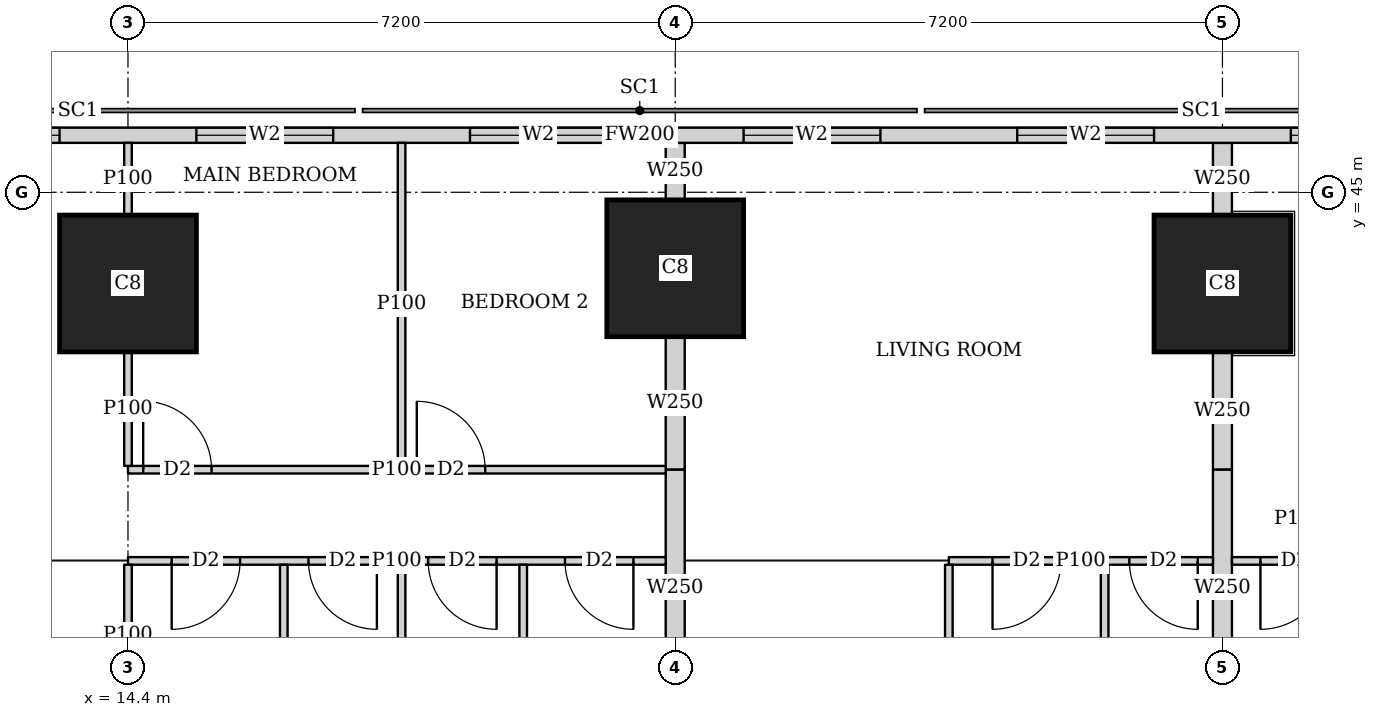
"""IFC4 building model, lengths in metres.
Left out: names, types, materials, properties, quantities, classifications, styles, units other than length and angle.
Written with IfcOpenShell. Run it as: python <this file> out.ifc"""

import sys

from ifc_helpers import new_model, si_unit, direction, frame, frame_2d, origin, origin_2d, place, context, subcontext, project, spatial, rectangle, extrude, element, fill, save


model = new_model("IFC4")
c1 = context("Model", 3, precision=1e-05, world=origin(), true_north=direction((0.0, 1.0)))
c2 = subcontext(c1, "Body", "Model", "MODEL_VIEW")
j1 = project(units=[si_unit("LENGTHUNIT", "METRE"), si_unit("PLANEANGLEUNIT", "RADIAN")], contexts=[c1])
p1 = place(None, origin())
s1 = spatial("IfcSite", under=j1, at=p1, CompositionType="ELEMENT")
p2 = place(p1, origin())
s2 = spatial("IfcBuilding", under=s1, at=p2, CompositionType="ELEMENT")
p3 = place(p2, frame((0.0, 0.0, 180.8)))
s3 = spatial("IfcBuildingStorey", under=s2, at=p3, CompositionType="ELEMENT", Elevation=180.8)
for number, where, z_axis, x_axis in (
    (1, (14.4, 43.8, 0.0), (0.0, 0.0, 1.0), (1.0, 0.0, 0.0)),
    (2, (21.6, 44.0, 0.0), (0.0, 0.0, 1.0), (1.0, 0.0, 0.0)),
    (3, (28.8, 43.8, 0.0), (0.0, 0.0, 1.0), (1.0, 0.0, 0.0)),
):
    element("IfcColumn", number, at=place(p3, frame(where, z_axis=z_axis, x_axis=x_axis)), inside=s3, PredefinedType="COLUMN", context=c2, shape_type="SweptSolid", body=[
        extrude(rectangle(XDim=1.8, YDim=1.8, at=origin_2d()), origin(), (0.0, 0.0, 1.0), 3.75),
    ])
p4 = place(p3, frame((40.106, 45.75, 0.0), z_axis=(0.0, 0.0, 1.0), x_axis=(-1.0, 0.0, 0.0)))
e4 = element("IfcWall", 4, at=p4, inside=s3, PredefinedType="SOLIDWALL", context=c2, shape_type="SweptSolid", body=[
    extrude(rectangle(XDim=37.943, YDim=0.2, at=frame_2d((18.971, 0.0))), origin(), (0.0, 0.0, 1.0), 3.5),
])
p5 = place(p4, frame((8.606, 0.0, 0.9)))
e5 = element("IfcOpeningElement", 5, at=p5, cuts=e4, PredefinedType="OPENING", context=c2, shape_type="SweptSolid", body=[
    extrude(rectangle(XDim=1.8, YDim=1.5, at=frame_2d((0.9, 0.75))), frame((0.0, 0.11, 0.0), z_axis=(0.0, -1.0, 0.0), x_axis=(1.0, 0.0, 0.0)), (0.0, 0.0, 1.0), 0.22),
])
p6 = place(p4, frame((12.206, 0.0, 0.9)))
e6 = element("IfcOpeningElement", 6, at=p6, cuts=e4, PredefinedType="OPENING", context=c2, shape_type="SweptSolid", body=[
    extrude(rectangle(XDim=1.8, YDim=1.5, at=frame_2d((0.9, 0.75))), frame((0.0, 0.11, 0.0), z_axis=(0.0, -1.0, 0.0), x_axis=(1.0, 0.0, 0.0)), (0.0, 0.0, 1.0), 0.22),
])
p7 = place(p4, frame((15.806, 0.0, 0.9)))
e7 = element("IfcOpeningElement", 7, at=p7, cuts=e4, PredefinedType="OPENING", context=c2, shape_type="SweptSolid", body=[
    extrude(rectangle(XDim=1.8, YDim=1.5, at=frame_2d((0.9, 0.75))), frame((0.0, 0.11, 0.0), z_axis=(0.0, -1.0, 0.0), x_axis=(1.0, 0.0, 0.0)), (0.0, 0.0, 1.0), 0.22),
])
p8 = place(p4, frame((19.406, 0.0, 0.9)))
e8 = element("IfcOpeningElement", 8, at=p8, cuts=e4, PredefinedType="OPENING", context=c2, shape_type="SweptSolid", body=[
    extrude(rectangle(XDim=1.8, YDim=1.5, at=frame_2d((0.9, 0.75))), frame((0.0, 0.11, 0.0), z_axis=(0.0, -1.0, 0.0), x_axis=(1.0, 0.0, 0.0)), (0.0, 0.0, 1.0), 0.22),
])
p9 = place(p4, frame((23.006, 0.0, 0.9)))
e9 = element("IfcOpeningElement", 9, at=p9, cuts=e4, PredefinedType="OPENING", context=c2, shape_type="SweptSolid", body=[
    extrude(rectangle(XDim=1.8, YDim=1.5, at=frame_2d((0.9, 0.75))), frame((0.0, 0.11, 0.0), z_axis=(0.0, -1.0, 0.0), x_axis=(1.0, 0.0, 0.0)), (0.0, 0.0, 1.0), 0.22),
])
p10 = place(p4, frame((26.606, 0.0, 0.9)))
e10 = element("IfcOpeningElement", 10, at=p10, cuts=e4, PredefinedType="OPENING", context=c2, shape_type="SweptSolid", body=[
    extrude(rectangle(XDim=1.8, YDim=1.5, at=frame_2d((0.9, 0.75))), frame((0.0, 0.11, 0.0), z_axis=(0.0, -1.0, 0.0), x_axis=(1.0, 0.0, 0.0)), (0.0, 0.0, 1.0), 0.22),
])
p11 = place(p3, frame((14.4, 41.35, 0.0), z_axis=(0.0, 0.0, 1.0), x_axis=(1.0, 0.0, 0.0)))
e11 = element("IfcWall", 11, at=p11, inside=s3, PredefinedType="PARTITIONING", context=c2, shape_type="SweptSolid", body=[
    extrude(rectangle(XDim=7.075, YDim=0.1, at=frame_2d((3.538, 0.0))), origin(), (0.0, 0.0, 1.0), 3.5),
])
p12 = place(p11, frame((0.2, 0.0, 0.0)))
e12 = element("IfcOpeningElement", 12, at=p12, cuts=e11, PredefinedType="OPENING", context=c2, shape_type="SweptSolid", body=[
    extrude(rectangle(XDim=0.9, YDim=2.1, at=frame_2d((0.45, 1.05))), frame((0.0, 0.06, 0.0), z_axis=(0.0, -1.0, 0.0), x_axis=(1.0, 0.0, 0.0)), (0.0, 0.0, 1.0), 0.12),
])
p13 = place(p11, frame((3.8, 0.0, 0.0)))
e13 = element("IfcOpeningElement", 13, at=p13, cuts=e11, PredefinedType="OPENING", context=c2, shape_type="SweptSolid", body=[
    extrude(rectangle(XDim=0.9, YDim=2.1, at=frame_2d((0.45, 1.05))), frame((0.0, 0.06, 0.0), z_axis=(0.0, -1.0, 0.0), x_axis=(1.0, 0.0, 0.0)), (0.0, 0.0, 1.0), 0.12),
])
p14 = place(p3, frame((14.4, 40.15, 0.0), z_axis=(0.0, 0.0, 1.0), x_axis=(1.0, 0.0, 0.0)))
e14 = element("IfcWall", 14, at=p14, inside=s3, PredefinedType="PARTITIONING", context=c2, shape_type="SweptSolid", body=[
    extrude(rectangle(XDim=7.075, YDim=0.1, at=frame_2d((3.538, 0.0))), origin(), (0.0, 0.0, 1.0), 3.5),
])
p15 = place(p14, frame((0.575, 0.0, 0.0)))
e15 = element("IfcOpeningElement", 15, at=p15, cuts=e14, PredefinedType="OPENING", context=c2, shape_type="SweptSolid", body=[
    extrude(rectangle(XDim=0.9, YDim=2.1, at=frame_2d((0.45, 1.05))), frame((0.0, 0.06, 0.0), z_axis=(0.0, -1.0, 0.0), x_axis=(1.0, 0.0, 0.0)), (0.0, 0.0, 1.0), 0.12),
])
p16 = place(p14, frame((3.95, 0.0, 0.0)))
e16 = element("IfcOpeningElement", 16, at=p16, cuts=e14, PredefinedType="OPENING", context=c2, shape_type="SweptSolid", body=[
    extrude(rectangle(XDim=0.9, YDim=2.1, at=frame_2d((0.45, 1.05))), frame((0.0, 0.06, 0.0), z_axis=(0.0, -1.0, 0.0), x_axis=(1.0, 0.0, 0.0)), (0.0, 0.0, 1.0), 0.12),
])
p17 = place(p14, frame((2.375, 0.0, 0.0)))
e17 = element("IfcOpeningElement", 17, at=p17, cuts=e14, PredefinedType="OPENING", context=c2, shape_type="SweptSolid", body=[
    extrude(rectangle(XDim=0.9, YDim=2.1, at=frame_2d((0.45, 1.05))), frame((0.0, 0.06, 0.0), z_axis=(0.0, -1.0, 0.0), x_axis=(1.0, 0.0, 0.0)), (0.0, 0.0, 1.0), 0.12),
])
p18 = place(p14, frame((5.75, 0.0, 0.0)))
e18 = element("IfcOpeningElement", 18, at=p18, cuts=e14, PredefinedType="OPENING", context=c2, shape_type="SweptSolid", body=[
    extrude(rectangle(XDim=0.9, YDim=2.1, at=frame_2d((0.45, 1.05))), frame((0.0, 0.06, 0.0), z_axis=(0.0, -1.0, 0.0), x_axis=(1.0, 0.0, 0.0)), (0.0, 0.0, 1.0), 0.12),
])
p19 = place(p3, frame((14.4, 41.4, 0.0), z_axis=(0.0, 0.0, 1.0), x_axis=(0.0, 1.0, 0.0)))
e19 = element("IfcWall", 19, at=p19, inside=s3, PredefinedType="PARTITIONING", context=c2, shape_type="SweptSolid", body=[
    extrude(rectangle(XDim=1.499, YDim=0.1, at=frame_2d((0.75, 0.0))), origin(), (0.0, 0.0, 1.0), 3.5),
])
p20 = place(p3, frame((14.4, 44.701, 0.0), z_axis=(0.0, 0.0, 1.0), x_axis=(0.0, 1.0, 0.0)))
e20 = element("IfcWall", 20, at=p20, inside=s3, PredefinedType="PARTITIONING", context=c2, shape_type="SweptSolid", body=[
    extrude(rectangle(XDim=0.949, YDim=0.1, at=frame_2d((0.475, 0.0))), origin(), (0.0, 0.0, 1.0), 3.5),
])
p21 = place(p3, frame((18.0, 41.4, 0.0), z_axis=(0.0, 0.0, 1.0), x_axis=(0.0, 1.0, 0.0)))
e21 = element("IfcWall", 21, at=p21, inside=s3, PredefinedType="PARTITIONING", context=c2, shape_type="SweptSolid", body=[
    extrude(rectangle(XDim=4.25, YDim=0.1, at=frame_2d((2.125, 0.0))), origin(), (0.0, 0.0, 1.0), 2.1),
])
p22 = place(p3, frame((14.4, 38.251, 0.0), z_axis=(0.0, 0.0, 1.0), x_axis=(0.0, 1.0, 0.0)))
e22 = element("IfcWall", 22, at=p22, inside=s3, PredefinedType="PARTITIONING", context=c2, shape_type="SweptSolid", body=[
    extrude(rectangle(XDim=1.849, YDim=0.1, at=frame_2d((0.925, 0.0))), origin(), (0.0, 0.0, 1.0), 3.5),
])
for number, where, z_axis, x_axis in (
    (23, (18.0, 36.575, 0.0), (0.0, 0.0, 1.0), (0.0, 1.0, 0.0)),
    (24, (16.45, 36.575, 0.0), (0.0, 0.0, 1.0), (0.0, 1.0, 0.0)),
    (25, (19.6, 36.575, 0.0), (0.0, 0.0, 1.0), (0.0, 1.0, 0.0)),
):
    element("IfcWall", number, at=place(p3, frame(where, z_axis=z_axis, x_axis=x_axis)), inside=s3, PredefinedType="PARTITIONING", context=c2, shape_type="SweptSolid", body=[
        extrude(rectangle(XDim=3.525, YDim=0.1, at=frame_2d((1.763, 0.0))), origin(), (0.0, 0.0, 1.0), 3.5),
    ])
p23 = place(p3, frame((25.2, 40.15, 0.0), z_axis=(0.0, 0.0, 1.0), x_axis=(1.0, 0.0, 0.0)))
e26 = element("IfcWall", 26, at=p23, inside=s3, PredefinedType="PARTITIONING", context=c2, shape_type="SweptSolid", body=[
    extrude(rectangle(XDim=3.475, YDim=0.1, at=frame_2d((1.738, 0.0))), origin(), (0.0, 0.0, 1.0), 3.5),
])
p24 = place(p23, frame((0.575, 0.0, 0.0)))
e27 = element("IfcOpeningElement", 27, at=p24, cuts=e26, PredefinedType="OPENING", context=c2, shape_type="SweptSolid", body=[
    extrude(rectangle(XDim=0.9, YDim=2.1, at=frame_2d((0.45, 1.05))), frame((0.0, 0.06, 0.0), z_axis=(0.0, -1.0, 0.0), x_axis=(1.0, 0.0, 0.0)), (0.0, 0.0, 1.0), 0.12),
])
p25 = place(p23, frame((2.375, 0.0, 0.0)))
e28 = element("IfcOpeningElement", 28, at=p25, cuts=e26, PredefinedType="OPENING", context=c2, shape_type="SweptSolid", body=[
    extrude(rectangle(XDim=0.9, YDim=2.1, at=frame_2d((0.45, 1.05))), frame((0.0, 0.06, 0.0), z_axis=(0.0, -1.0, 0.0), x_axis=(1.0, 0.0, 0.0)), (0.0, 0.0, 1.0), 0.12),
])
for number, where, z_axis, x_axis in (
    (29, (25.2, 36.575, 0.0), (0.0, 0.0, 1.0), (0.0, 1.0, 0.0)),
    (30, (27.25, 36.575, 0.0), (0.0, 0.0, 1.0), (0.0, 1.0, 0.0)),
):
    element("IfcWall", number, at=place(p3, frame(where, z_axis=z_axis, x_axis=x_axis)), inside=s3, PredefinedType="PARTITIONING", context=c2, shape_type="SweptSolid", body=[
        extrude(rectangle(XDim=3.525, YDim=0.1, at=frame_2d((1.763, 0.0))), origin(), (0.0, 0.0, 1.0), 3.5),
    ])
p26 = place(p3, frame((21.6, 41.35, 0.0), z_axis=(0.0, 0.0, 1.0), x_axis=(0.0, 1.0, 0.0)))
e31 = element("IfcWall", 31, at=p26, inside=s3, PredefinedType="SOLIDWALL", context=c2, shape_type="SweptSolid", body=[
    extrude(rectangle(XDim=1.749, YDim=0.25, at=frame_2d((0.875, 0.0))), origin(), (0.0, 0.0, 1.0), 2.1),
])
p27 = place(p3, frame((21.6, 44.901, 0.0), z_axis=(0.0, 0.0, 1.0), x_axis=(0.0, 1.0, 0.0)))
e32 = element("IfcWall", 32, at=p27, inside=s3, PredefinedType="SOLIDWALL", context=c2, shape_type="SweptSolid", body=[
    extrude(rectangle(XDim=0.749, YDim=0.25, at=frame_2d((0.375, 0.0))), origin(), (0.0, 0.0, 1.0), 2.1),
])
p28 = place(p3, frame((21.6, 38.251, 0.0), z_axis=(0.0, 0.0, 1.0), x_axis=(0.0, 1.0, 0.0)))
e33 = element("IfcWall", 33, at=p28, inside=s3, PredefinedType="SOLIDWALL", context=c2, shape_type="SweptSolid", body=[
    extrude(rectangle(XDim=3.099, YDim=0.25, at=frame_2d((1.55, 0.0))), origin(), (0.0, 0.0, 1.0), 3.5),
])
p29 = place(p3, frame((28.925, 40.15, 0.0), z_axis=(0.0, 0.0, 1.0), x_axis=(1.0, 0.0, 0.0)))
e34 = element("IfcWall", 34, at=p29, inside=s3, PredefinedType="PARTITIONING", context=c2, shape_type="SweptSolid", body=[
    extrude(rectangle(XDim=1.765, YDim=0.1, at=frame_2d((0.882, 0.0))), origin(), (0.0, 0.0, 1.0), 3.5),
])
p30 = place(p29, frame((0.375, 0.0, 0.0)))
e35 = element("IfcOpeningElement", 35, at=p30, cuts=e34, PredefinedType="OPENING", context=c2, shape_type="SweptSolid", body=[
    extrude(rectangle(XDim=0.9, YDim=2.1, at=frame_2d((0.45, 1.05))), frame((0.0, 0.06, 0.0), z_axis=(0.0, -1.0, 0.0), x_axis=(1.0, 0.0, 0.0)), (0.0, 0.0, 1.0), 0.12),
])
p31 = place(p3, frame((28.8, 41.35, 0.0), z_axis=(0.0, 0.0, 1.0), x_axis=(0.0, 1.0, 0.0)))
e36 = element("IfcWall", 36, at=p31, inside=s3, PredefinedType="SOLIDWALL", context=c2, shape_type="SweptSolid", body=[
    extrude(rectangle(XDim=1.549, YDim=0.25, at=frame_2d((0.774, 0.0))), origin(), (0.0, 0.0, 1.0), 2.1),
])
p32 = place(p3, frame((28.8, 44.701, 0.0), z_axis=(0.0, 0.0, 1.0), x_axis=(0.0, 1.0, 0.0)))
e37 = element("IfcWall", 37, at=p32, inside=s3, PredefinedType="SOLIDWALL", context=c2, shape_type="SweptSolid", body=[
    extrude(rectangle(XDim=0.949, YDim=0.25, at=frame_2d((0.475, 0.0))), origin(), (0.0, 0.0, 1.0), 2.1),
])
p33 = place(p3, frame((28.8, 38.251, 0.0), z_axis=(0.0, 0.0, 1.0), x_axis=(0.0, 1.0, 0.0)))
e38 = element("IfcWall", 38, at=p33, inside=s3, PredefinedType="SOLIDWALL", context=c2, shape_type="SweptSolid", body=[
    extrude(rectangle(XDim=3.099, YDim=0.25, at=frame_2d((1.55, 0.0))), origin(), (0.0, 0.0, 1.0), 3.5),
])
p34 = place(p5, origin())
e39 = element("IfcWindow", 39, at=p34, inside=s3, PartitioningType="SINGLE_PANEL", PredefinedType="WINDOW", context=c2, shape_type="SweptSolid", body=[
    extrude(rectangle(XDim=1.8, YDim=1.5, at=frame_2d((0.9, 0.75))), frame((0.0, 0.03, 0.0), z_axis=(0.0, -1.0, 0.0), x_axis=(1.0, 0.0, 0.0)), (0.0, 0.0, 1.0), 0.06),
])
fill(e5, e39)
p35 = place(p6, origin())
e40 = element("IfcWindow", 40, at=p35, inside=s3, PartitioningType="SINGLE_PANEL", PredefinedType="WINDOW", context=c2, shape_type="SweptSolid", body=[
    extrude(rectangle(XDim=1.8, YDim=1.5, at=frame_2d((0.9, 0.75))), frame((0.0, 0.03, 0.0), z_axis=(0.0, -1.0, 0.0), x_axis=(1.0, 0.0, 0.0)), (0.0, 0.0, 1.0), 0.06),
])
fill(e6, e40)
p36 = place(p7, origin())
e41 = element("IfcWindow", 41, at=p36, inside=s3, PartitioningType="SINGLE_PANEL", PredefinedType="WINDOW", context=c2, shape_type="SweptSolid", body=[
    extrude(rectangle(XDim=1.8, YDim=1.5, at=frame_2d((0.9, 0.75))), frame((0.0, 0.03, 0.0), z_axis=(0.0, -1.0, 0.0), x_axis=(1.0, 0.0, 0.0)), (0.0, 0.0, 1.0), 0.06),
])
fill(e7, e41)
p37 = place(p8, origin())
e42 = element("IfcWindow", 42, at=p37, inside=s3, PartitioningType="SINGLE_PANEL", PredefinedType="WINDOW", context=c2, shape_type="SweptSolid", body=[
    extrude(rectangle(XDim=1.8, YDim=1.5, at=frame_2d((0.9, 0.75))), frame((0.0, 0.03, 0.0), z_axis=(0.0, -1.0, 0.0), x_axis=(1.0, 0.0, 0.0)), (0.0, 0.0, 1.0), 0.06),
])
fill(e8, e42)
p38 = place(p9, origin())
e43 = element("IfcWindow", 43, at=p38, inside=s3, PartitioningType="SINGLE_PANEL", PredefinedType="WINDOW", context=c2, shape_type="SweptSolid", body=[
    extrude(rectangle(XDim=1.8, YDim=1.5, at=frame_2d((0.9, 0.75))), frame((0.0, 0.03, 0.0), z_axis=(0.0, -1.0, 0.0), x_axis=(1.0, 0.0, 0.0)), (0.0, 0.0, 1.0), 0.06),
])
fill(e9, e43)
p39 = place(p10, origin())
e44 = element("IfcWindow", 44, at=p39, inside=s3, PartitioningType="SINGLE_PANEL", PredefinedType="WINDOW", context=c2, shape_type="SweptSolid", body=[
    extrude(rectangle(XDim=1.8, YDim=1.5, at=frame_2d((0.9, 0.75))), frame((0.0, 0.03, 0.0), z_axis=(0.0, -1.0, 0.0), x_axis=(1.0, 0.0, 0.0)), (0.0, 0.0, 1.0), 0.06),
])
fill(e10, e44)
p40 = place(p12, origin())
e45 = element("IfcDoor", 45, at=p40, inside=s3, OperationType="SINGLE_SWING_LEFT", PredefinedType="DOOR", context=c2, shape_type="SweptSolid", body=[
    extrude(rectangle(XDim=0.9, YDim=2.1, at=frame_2d((0.45, 1.05))), frame((0.0, 0.025, 0.0), z_axis=(0.0, -1.0, 0.0), x_axis=(1.0, 0.0, 0.0)), (0.0, 0.0, 1.0), 0.05),
])
fill(e12, e45)
p41 = place(p13, origin())
e46 = element("IfcDoor", 46, at=p41, inside=s3, OperationType="SINGLE_SWING_LEFT", PredefinedType="DOOR", context=c2, shape_type="SweptSolid", body=[
    extrude(rectangle(XDim=0.9, YDim=2.1, at=frame_2d((0.45, 1.05))), frame((0.0, 0.025, 0.0), z_axis=(0.0, -1.0, 0.0), x_axis=(1.0, 0.0, 0.0)), (0.0, 0.0, 1.0), 0.05),
])
fill(e13, e46)
p42 = place(p15, origin())
e47 = element("IfcDoor", 47, at=p42, inside=s3, OperationType="SINGLE_SWING_RIGHT", PredefinedType="DOOR", context=c2, shape_type="SweptSolid", body=[
    extrude(rectangle(XDim=0.9, YDim=2.1, at=frame_2d((0.45, 1.05))), frame((0.0, 0.025, 0.0), z_axis=(0.0, -1.0, 0.0), x_axis=(1.0, 0.0, 0.0)), (0.0, 0.0, 1.0), 0.05),
])
fill(e15, e47)
p43 = place(p16, origin())
e48 = element("IfcDoor", 48, at=p43, inside=s3, OperationType="SINGLE_SWING_LEFT", PredefinedType="DOOR", context=c2, shape_type="SweptSolid", body=[
    extrude(rectangle(XDim=0.9, YDim=2.1, at=frame_2d((0.45, 1.05))), frame((0.0, 0.025, 0.0), z_axis=(0.0, -1.0, 0.0), x_axis=(1.0, 0.0, 0.0)), (0.0, 0.0, 1.0), 0.05),
])
fill(e16, e48)
p44 = place(p17, origin())
e49 = element("IfcDoor", 49, at=p44, inside=s3, OperationType="SINGLE_SWING_LEFT", PredefinedType="DOOR", context=c2, shape_type="SweptSolid", body=[
    extrude(rectangle(XDim=0.9, YDim=2.1, at=frame_2d((0.45, 1.05))), frame((0.0, 0.025, 0.0), z_axis=(0.0, -1.0, 0.0), x_axis=(1.0, 0.0, 0.0)), (0.0, 0.0, 1.0), 0.05),
])
fill(e17, e49)
p45 = place(p18, origin())
e50 = element("IfcDoor", 50, at=p45, inside=s3, OperationType="SINGLE_SWING_LEFT", PredefinedType="DOOR", context=c2, shape_type="SweptSolid", body=[
    extrude(rectangle(XDim=0.9, YDim=2.1, at=frame_2d((0.45, 1.05))), frame((0.0, 0.025, 0.0), z_axis=(0.0, -1.0, 0.0), x_axis=(1.0, 0.0, 0.0)), (0.0, 0.0, 1.0), 0.05),
])
fill(e18, e50)
p46 = place(p24, origin())
e51 = element("IfcDoor", 51, at=p46, inside=s3, OperationType="SINGLE_SWING_RIGHT", PredefinedType="DOOR", context=c2, shape_type="SweptSolid", body=[
    extrude(rectangle(XDim=0.9, YDim=2.1, at=frame_2d((0.45, 1.05))), frame((0.0, 0.025, 0.0), z_axis=(0.0, -1.0, 0.0), x_axis=(1.0, 0.0, 0.0)), (0.0, 0.0, 1.0), 0.05),
])
fill(e27, e51)
p47 = place(p25, origin())
e52 = element("IfcDoor", 52, at=p47, inside=s3, OperationType="SINGLE_SWING_LEFT", PredefinedType="DOOR", context=c2, shape_type="SweptSolid", body=[
    extrude(rectangle(XDim=0.9, YDim=2.1, at=frame_2d((0.45, 1.05))), frame((0.0, 0.025, 0.0), z_axis=(0.0, -1.0, 0.0), x_axis=(1.0, 0.0, 0.0)), (0.0, 0.0, 1.0), 0.05),
])
fill(e28, e52)
p48 = place(p30, origin())
e53 = element("IfcDoor", 53, at=p48, inside=s3, OperationType="SINGLE_SWING_RIGHT", PredefinedType="DOOR", context=c2, shape_type="SweptSolid", body=[
    extrude(rectangle(XDim=0.9, YDim=2.1, at=frame_2d((0.45, 1.05))), frame((0.0, 0.025, 0.0), z_axis=(0.0, -1.0, 0.0), x_axis=(1.0, 0.0, 0.0)), (0.0, 0.0, 1.0), 0.05),
])
fill(e35, e53)
save(model, sys.argv[1])
